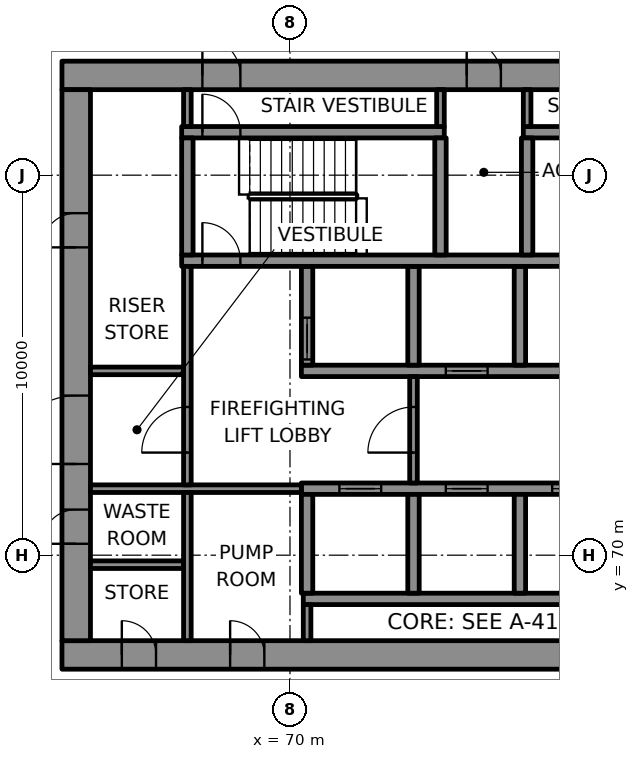
"""IFC4 building model, lengths in metres.
Left out: names, types, materials, properties, quantities, classifications, styles, units other than length and angle.
Written with IfcOpenShell. Run it as: python <this file> out.ifc"""

import sys

from ifc_helpers import new_model, si_unit, direction, frame, frame_2d, origin, place, context, subcontext, project, spatial, rectangle, extrude, element, fill, save


model = new_model("IFC4")
c1 = context("Model", 3, precision=1e-05, world=origin(), true_north=direction((0.0, 1.0)))
c2 = subcontext(c1, "Body", "Model", "MODEL_VIEW")
j1 = project(units=[si_unit("LENGTHUNIT", "METRE"), si_unit("PLANEANGLEUNIT", "RADIAN")], contexts=[c1])
p1 = place(None, origin())
s1 = spatial("IfcSite", under=j1, at=p1, CompositionType="ELEMENT")
p2 = place(p1, origin())
s2 = spatial("IfcBuilding", under=s1, at=p2, CompositionType="ELEMENT")
p3 = place(p2, frame((0.0, 0.0, 183.1)))
s3 = spatial("IfcBuildingStorey", under=s2, at=p3, CompositionType="ELEMENT", Elevation=183.1)
p4 = place(p3, frame((64.0, 67.375, 0.0), z_axis=(0.0, 0.0, 1.0), x_axis=(1.0, 0.0, 0.0)))
e1 = element("IfcWall", 1, at=p4, inside=s3, PredefinedType="SHEAR", context=c2, shape_type="SweptSolid", body=[
    extrude(rectangle(XDim=22.0, YDim=0.75, at=frame_2d((11.0, 0.0))), origin(), (0.0, 0.0, 1.0), 3.7),
])
p5 = place(p4, frame((1.575, 0.0, 0.0)))
e2 = element("IfcOpeningElement", 2, at=p5, cuts=e1, PredefinedType="OPENING", context=c2, shape_type="SweptSolid", body=[
    extrude(rectangle(XDim=0.9, YDim=2.1, at=frame_2d((0.45, 1.05))), frame((0.0, 0.385, 0.0), z_axis=(0.0, -1.0, 0.0), x_axis=(1.0, 0.0, 0.0)), (0.0, 0.0, 1.0), 0.77),
])
p6 = place(p4, frame((4.425, 0.0, 0.0)))
e3 = element("IfcOpeningElement", 3, at=p6, cuts=e1, PredefinedType="OPENING", context=c2, shape_type="SweptSolid", body=[
    extrude(rectangle(XDim=0.9, YDim=2.1, at=frame_2d((0.45, 1.05))), frame((0.0, 0.385, 0.0), z_axis=(0.0, -1.0, 0.0), x_axis=(1.0, 0.0, 0.0)), (0.0, 0.0, 1.0), 0.77),
])
p7 = place(p3, frame((64.0, 82.625, 0.0), z_axis=(0.0, 0.0, 1.0), x_axis=(1.0, 0.0, 0.0)))
e4 = element("IfcWall", 4, at=p7, inside=s3, PredefinedType="SHEAR", context=c2, shape_type="SweptSolid", body=[
    extrude(rectangle(XDim=22.0, YDim=0.75, at=frame_2d((11.0, 0.0))), origin(), (0.0, 0.0, 1.0), 3.7),
])
p8 = place(p7, frame((3.695, 0.0, 0.0)))
e5 = element("IfcOpeningElement", 5, at=p8, cuts=e4, PredefinedType="OPENING", context=c2, shape_type="SweptSolid", body=[
    extrude(rectangle(XDim=1.0, YDim=2.1, at=frame_2d((0.5, 1.05))), frame((0.0, 0.385, 0.0), z_axis=(0.0, -1.0, 0.0), x_axis=(1.0, 0.0, 0.0)), (0.0, 0.0, 1.0), 0.77),
])
p9 = place(p7, frame((17.505, 0.0, 0.0)))
e6 = element("IfcOpeningElement", 6, at=p9, cuts=e4, PredefinedType="OPENING", context=c2, shape_type="SweptSolid", body=[
    extrude(rectangle(XDim=1.0, YDim=2.1, at=frame_2d((0.5, 1.05))), frame((0.0, 0.385, 0.0), z_axis=(0.0, -1.0, 0.0), x_axis=(1.0, 0.0, 0.0)), (0.0, 0.0, 1.0), 0.77),
])
p10 = place(p7, frame((10.65, 0.0, 0.0)))
e7 = element("IfcOpeningElement", 7, at=p10, cuts=e4, PredefinedType="OPENING", context=c2, shape_type="SweptSolid", body=[
    extrude(rectangle(XDim=0.9, YDim=2.1, at=frame_2d((0.45, 1.05))), frame((0.0, 0.385, 0.0), z_axis=(0.0, -1.0, 0.0), x_axis=(1.0, 0.0, 0.0)), (0.0, 0.0, 1.0), 0.77),
])
p11 = place(p3, frame((64.375, 67.75, 0.0), z_axis=(0.0, 0.0, 1.0), x_axis=(0.0, 1.0, 0.0)))
e8 = element("IfcWall", 8, at=p11, inside=s3, PredefinedType="SHEAR", context=c2, shape_type="SweptSolid", body=[
    extrude(rectangle(XDim=14.5, YDim=0.75, at=frame_2d((7.25, 0.0))), origin(), (0.0, 0.0, 1.0), 3.7),
])
p12 = place(p11, frame((4.65, 0.0, 0.0)))
e9 = element("IfcOpeningElement", 9, at=p12, cuts=e8, PredefinedType="OPENING", context=c2, shape_type="SweptSolid", body=[
    extrude(rectangle(XDim=1.8, YDim=2.1, at=frame_2d((0.9, 1.05))), frame((0.0, 0.385, 0.0), z_axis=(0.0, -1.0, 0.0), x_axis=(1.0, 0.0, 0.0)), (0.0, 0.0, 1.0), 0.77),
])
p13 = place(p11, frame((2.55, 0.0, 0.0)))
e10 = element("IfcOpeningElement", 10, at=p13, cuts=e8, PredefinedType="OPENING", context=c2, shape_type="SweptSolid", body=[
    extrude(rectangle(XDim=0.9, YDim=2.1, at=frame_2d((0.45, 1.05))), frame((0.0, 0.385, 0.0), z_axis=(0.0, -1.0, 0.0), x_axis=(1.0, 0.0, 0.0)), (0.0, 0.0, 1.0), 0.77),
])
p14 = place(p11, frame((10.35, 0.0, 0.0)))
e11 = element("IfcOpeningElement", 11, at=p14, cuts=e8, PredefinedType="OPENING", context=c2, shape_type="SweptSolid", body=[
    extrude(rectangle(XDim=0.9, YDim=2.1, at=frame_2d((0.45, 1.05))), frame((0.0, 0.385, 0.0), z_axis=(0.0, -1.0, 0.0), x_axis=(1.0, 0.0, 0.0)), (0.0, 0.0, 1.0), 0.77),
])
p15 = place(p3, frame((70.35, 68.85, 0.0), z_axis=(0.0, 0.0, 1.0), x_axis=(1.0, 0.0, 0.0)))
e12 = element("IfcWall", 12, at=p15, inside=s3, PredefinedType="SHEAR", context=c2, shape_type="SweptSolid", body=[
    extrude(rectangle(XDim=14.2, YDim=0.3, at=frame_2d((7.1, 0.0))), origin(), (0.0, 0.0, 1.0), 3.7),
])
p16 = place(p3, frame((70.3, 71.75, 0.0), z_axis=(0.0, 0.0, 1.0), x_axis=(1.0, 0.0, 0.0)))
e13 = element("IfcWall", 13, at=p16, inside=s3, PredefinedType="SHEAR", context=c2, shape_type="SweptSolid", body=[
    extrude(rectangle(XDim=14.3, YDim=0.3, at=frame_2d((7.15, 0.0))), origin(), (0.0, 0.0, 1.0), 3.7),
])
p17 = place(p16, frame((1.0, 0.0, 0.0)))
e14 = element("IfcOpeningElement", 14, at=p17, cuts=e13, PredefinedType="OPENING", context=c2, shape_type="SweptSolid", body=[
    extrude(rectangle(XDim=1.1, YDim=2.1, at=frame_2d((0.55, 1.05))), frame((0.0, 0.16, 0.0), z_axis=(0.0, -1.0, 0.0), x_axis=(1.0, 0.0, 0.0)), (0.0, 0.0, 1.0), 0.32),
])
p18 = place(p16, frame((3.8, 0.0, 0.0)))
e15 = element("IfcOpeningElement", 15, at=p18, cuts=e13, PredefinedType="OPENING", context=c2, shape_type="SweptSolid", body=[
    extrude(rectangle(XDim=1.1, YDim=2.1, at=frame_2d((0.55, 1.05))), frame((0.0, 0.16, 0.0), z_axis=(0.0, -1.0, 0.0), x_axis=(1.0, 0.0, 0.0)), (0.0, 0.0, 1.0), 0.32),
])
p19 = place(p16, frame((6.6, 0.0, 0.0)))
e16 = element("IfcOpeningElement", 16, at=p19, cuts=e13, PredefinedType="OPENING", context=c2, shape_type="SweptSolid", body=[
    extrude(rectangle(XDim=1.1, YDim=2.1, at=frame_2d((0.55, 1.05))), frame((0.0, 0.16, 0.0), z_axis=(0.0, -1.0, 0.0), x_axis=(1.0, 0.0, 0.0)), (0.0, 0.0, 1.0), 0.32),
])
p20 = place(p16, frame((9.4, 0.0, 0.0)))
e17 = element("IfcOpeningElement", 17, at=p20, cuts=e13, PredefinedType="OPENING", context=c2, shape_type="SweptSolid", body=[
    extrude(rectangle(XDim=1.1, YDim=2.1, at=frame_2d((0.55, 1.05))), frame((0.0, 0.16, 0.0), z_axis=(0.0, -1.0, 0.0), x_axis=(1.0, 0.0, 0.0)), (0.0, 0.0, 1.0), 0.32),
])
p21 = place(p16, frame((12.2, 0.0, 0.0)))
e18 = element("IfcOpeningElement", 18, at=p21, cuts=e13, PredefinedType="OPENING", context=c2, shape_type="SweptSolid", body=[
    extrude(rectangle(XDim=1.1, YDim=2.1, at=frame_2d((0.55, 1.05))), frame((0.0, 0.16, 0.0), z_axis=(0.0, -1.0, 0.0), x_axis=(1.0, 0.0, 0.0)), (0.0, 0.0, 1.0), 0.32),
])
p22 = place(p3, frame((70.3, 74.85, 0.0), z_axis=(0.0, 0.0, 1.0), x_axis=(1.0, 0.0, 0.0)))
e19 = element("IfcWall", 19, at=p22, inside=s3, PredefinedType="SHEAR", context=c2, shape_type="SweptSolid", body=[
    extrude(rectangle(XDim=14.3, YDim=0.3, at=frame_2d((7.15, 0.0))), origin(), (0.0, 0.0, 1.0), 3.7),
])
p23 = place(p22, frame((3.8, 0.0, 0.0)))
e20 = element("IfcOpeningElement", 20, at=p23, cuts=e19, PredefinedType="OPENING", context=c2, shape_type="SweptSolid", body=[
    extrude(rectangle(XDim=1.1, YDim=2.1, at=frame_2d((0.55, 1.05))), frame((0.0, 0.16, 0.0), z_axis=(0.0, -1.0, 0.0), x_axis=(1.0, 0.0, 0.0)), (0.0, 0.0, 1.0), 0.32),
])
p24 = place(p22, frame((12.2, 0.0, 0.0)))
e21 = element("IfcOpeningElement", 21, at=p24, cuts=e19, PredefinedType="OPENING", context=c2, shape_type="SweptSolid", body=[
    extrude(rectangle(XDim=1.1, YDim=2.1, at=frame_2d((0.55, 1.05))), frame((0.0, 0.16, 0.0), z_axis=(0.0, -1.0, 0.0), x_axis=(1.0, 0.0, 0.0)), (0.0, 0.0, 1.0), 0.32),
])
p25 = place(p3, frame((70.45, 69.0, 0.0), z_axis=(0.0, 0.0, 1.0), x_axis=(0.0, 1.0, 0.0)))
e22 = element("IfcWall", 22, at=p25, inside=s3, PredefinedType="SHEAR", context=c2, shape_type="SweptSolid", body=[
    extrude(rectangle(XDim=2.6, YDim=0.3, at=frame_2d((1.3, 0.0))), origin(), (0.0, 0.0, 1.0), 3.7),
])
p26 = place(p3, frame((70.45, 75.0, 0.0), z_axis=(0.0, 0.0, 1.0), x_axis=(0.0, 1.0, 0.0)))
e23 = element("IfcWall", 23, at=p26, inside=s3, PredefinedType="SHEAR", context=c2, shape_type="SweptSolid", body=[
    extrude(rectangle(XDim=2.6, YDim=0.3, at=frame_2d((1.3, 0.0))), origin(), (0.0, 0.0, 1.0), 3.7),
])
p27 = place(p26, frame((0.15, 0.0, 0.0)))
e24 = element("IfcOpeningElement", 24, at=p27, cuts=e23, PredefinedType="OPENING", context=c2, shape_type="SweptSolid", body=[
    extrude(rectangle(XDim=1.1, YDim=2.1, at=frame_2d((0.55, 1.05))), frame((0.0, 0.16, 0.0), z_axis=(0.0, -1.0, 0.0), x_axis=(1.0, 0.0, 0.0)), (0.0, 0.0, 1.0), 0.32),
])
for number, where, z_axis, x_axis in (
    (25, (73.25, 69.0, 0.0), (0.0, 0.0, 1.0), (0.0, 1.0, 0.0)),
    (26, (73.25, 75.0, 0.0), (0.0, 0.0, 1.0), (0.0, 1.0, 0.0)),
    (27, (76.05, 69.0, 0.0), (0.0, 0.0, 1.0), (0.0, 1.0, 0.0)),
    (28, (76.05, 75.0, 0.0), (0.0, 0.0, 1.0), (0.0, 1.0, 0.0)),
):
    element("IfcWall", number, at=place(p3, frame(where, z_axis=z_axis, x_axis=x_axis)), inside=s3, PredefinedType="SHEAR", context=c2, shape_type="SweptSolid", body=[
        extrude(rectangle(XDim=2.6, YDim=0.3, at=frame_2d((1.3, 0.0))), origin(), (0.0, 0.0, 1.0), 3.7),
    ])
p28 = place(p3, frame((67.15, 77.75, 0.0), z_axis=(0.0, 0.0, 1.0), x_axis=(1.0, 0.0, 0.0)))
e29 = element("IfcWall", 29, at=p28, inside=s3, PredefinedType="SHEAR", context=c2, shape_type="SweptSolid", body=[
    extrude(rectangle(XDim=17.45, YDim=0.3, at=frame_2d((8.725, 0.0))), origin(), (0.0, 0.0, 1.0), 3.7),
])
p29 = place(p28, frame((0.545, 0.0, 0.0)))
e30 = element("IfcOpeningElement", 30, at=p29, cuts=e29, PredefinedType="OPENING", context=c2, shape_type="SweptSolid", body=[
    extrude(rectangle(XDim=1.0, YDim=2.1, at=frame_2d((0.5, 1.05))), frame((0.0, 0.16, 0.0), z_axis=(0.0, -1.0, 0.0), x_axis=(1.0, 0.0, 0.0)), (0.0, 0.0, 1.0), 0.32),
])
p30 = place(p3, frame((67.15, 81.13, 0.0), z_axis=(0.0, 0.0, 1.0), x_axis=(1.0, 0.0, 0.0)))
e31 = element("IfcWall", 31, at=p30, inside=s3, PredefinedType="SHEAR", context=c2, shape_type="SweptSolid", body=[
    extrude(rectangle(XDim=6.91, YDim=0.3, at=frame_2d((3.455, 0.0))), origin(), (0.0, 0.0, 1.0), 3.7),
])
p31 = place(p30, frame((0.545, 0.0, 0.0)))
e32 = element("IfcOpeningElement", 32, at=p31, cuts=e31, PredefinedType="OPENING", context=c2, shape_type="SweptSolid", body=[
    extrude(rectangle(XDim=1.0, YDim=2.1, at=frame_2d((0.5, 1.05))), frame((0.0, 0.16, 0.0), z_axis=(0.0, -1.0, 0.0), x_axis=(1.0, 0.0, 0.0)), (0.0, 0.0, 1.0), 0.32),
])
p32 = place(p3, frame((76.14, 81.13, 0.0), z_axis=(0.0, 0.0, 1.0), x_axis=(1.0, 0.0, 0.0)))
e33 = element("IfcWall", 33, at=p32, inside=s3, PredefinedType="SHEAR", context=c2, shape_type="SweptSolid", body=[
    extrude(rectangle(XDim=6.86, YDim=0.3, at=frame_2d((3.43, 0.0))), origin(), (0.0, 0.0, 1.0), 3.7),
])
p33 = place(p32, frame((5.365, 0.0, 0.0)))
e34 = element("IfcOpeningElement", 34, at=p33, cuts=e33, PredefinedType="OPENING", context=c2, shape_type="SweptSolid", body=[
    extrude(rectangle(XDim=1.0, YDim=2.1, at=frame_2d((0.5, 1.05))), frame((0.0, 0.16, 0.0), z_axis=(0.0, -1.0, 0.0), x_axis=(1.0, 0.0, 0.0)), (0.0, 0.0, 1.0), 0.32),
])
for number, where, z_axis, x_axis in (
    (35, (67.3, 77.9, 0.0), (0.0, 0.0, 1.0), (0.0, 1.0, 0.0)),
    (36, (73.96, 77.9, 0.0), (0.0, 0.0, 1.0), (0.0, 1.0, 0.0)),
    (37, (76.24, 77.9, 0.0), (0.0, 0.0, 1.0), (0.0, 1.0, 0.0)),
):
    element("IfcWall", number, at=place(p3, frame(where, z_axis=z_axis, x_axis=x_axis)), inside=s3, PredefinedType="SHEAR", context=c2, shape_type="SweptSolid", body=[
        extrude(rectangle(XDim=3.08, YDim=0.3, at=frame_2d((1.54, 0.0))), origin(), (0.0, 0.0, 1.0), 3.7),
    ])
p34 = place(p3, frame((64.75, 69.75, 0.0), z_axis=(0.0, 0.0, 1.0), x_axis=(1.0, 0.0, 0.0)))
e38 = element("IfcWall", 38, at=p34, inside=s3, PredefinedType="PARTITIONING", context=c2, shape_type="SweptSolid", body=[
    extrude(rectangle(XDim=2.45, YDim=0.2, at=frame_2d((1.225, 0.0))), origin(), (0.0, 0.0, 1.0), 3.7),
])
p35 = place(p3, frame((64.75, 71.75, 0.0), z_axis=(0.0, 0.0, 1.0), x_axis=(1.0, 0.0, 0.0)))
e39 = element("IfcWall", 39, at=p35, inside=s3, PredefinedType="PARTITIONING", context=c2, shape_type="SweptSolid", body=[
    extrude(rectangle(XDim=5.55, YDim=0.2, at=frame_2d((2.775, 0.0))), origin(), (0.0, 0.0, 1.0), 3.7),
])
p36 = place(p3, frame((64.75, 74.85, 0.0), z_axis=(0.0, 0.0, 1.0), x_axis=(1.0, 0.0, 0.0)))
e40 = element("IfcWall", 40, at=p36, inside=s3, PredefinedType="PARTITIONING", context=c2, shape_type="SweptSolid", body=[
    extrude(rectangle(XDim=2.45, YDim=0.2, at=frame_2d((1.225, 0.0))), origin(), (0.0, 0.0, 1.0), 3.7),
])
p37 = place(p3, frame((67.3, 67.75, 0.0), z_axis=(0.0, 0.0, 1.0), x_axis=(0.0, 1.0, 0.0)))
e41 = element("IfcWall", 41, at=p37, inside=s3, PredefinedType="PARTITIONING", context=c2, shape_type="SweptSolid", body=[
    extrude(rectangle(XDim=3.9, YDim=0.2, at=frame_2d((1.95, 0.0))), origin(), (0.0, 0.0, 1.0), 3.7),
])
p38 = place(p3, frame((67.3, 71.85, 0.0), z_axis=(0.0, 0.0, 1.0), x_axis=(0.0, 1.0, 0.0)))
e42 = element("IfcWall", 42, at=p38, inside=s3, PredefinedType="PARTITIONING", context=c2, shape_type="SweptSolid", body=[
    extrude(rectangle(XDim=5.75, YDim=0.2, at=frame_2d((2.875, 0.0))), origin(), (0.0, 0.0, 1.0), 3.7),
])
p39 = place(p38, frame((0.85, 0.0, 0.0)))
e43 = element("IfcOpeningElement", 43, at=p39, cuts=e42, PredefinedType="OPENING", context=c2, shape_type="SweptSolid", body=[
    extrude(rectangle(XDim=1.2, YDim=2.1, at=frame_2d((0.6, 1.05))), frame((0.0, 0.11, 0.0), z_axis=(0.0, -1.0, 0.0), x_axis=(1.0, 0.0, 0.0)), (0.0, 0.0, 1.0), 0.22),
])
p40 = place(p3, frame((67.3, 81.28, 0.0), z_axis=(0.0, 0.0, 1.0), x_axis=(0.0, 1.0, 0.0)))
e44 = element("IfcWall", 44, at=p40, inside=s3, PredefinedType="PARTITIONING", context=c2, shape_type="SweptSolid", body=[
    extrude(rectangle(XDim=0.97, YDim=0.2, at=frame_2d((0.485, 0.0))), origin(), (0.0, 0.0, 1.0), 3.7),
])
p41 = place(p3, frame((70.45, 67.75, 0.0), z_axis=(0.0, 0.0, 1.0), x_axis=(0.0, 1.0, 0.0)))
e45 = element("IfcWall", 45, at=p41, inside=s3, PredefinedType="PARTITIONING", context=c2, shape_type="SweptSolid", body=[
    extrude(rectangle(XDim=0.95, YDim=0.2, at=frame_2d((0.475, 0.0))), origin(), (0.0, 0.0, 1.0), 3.7),
])
p42 = place(p3, frame((73.25, 71.9, 0.0), z_axis=(0.0, 0.0, 1.0), x_axis=(0.0, 1.0, 0.0)))
e46 = element("IfcWall", 46, at=p42, inside=s3, PredefinedType="PARTITIONING", context=c2, shape_type="SweptSolid", body=[
    extrude(rectangle(XDim=2.8, YDim=0.2, at=frame_2d((1.4, 0.0))), origin(), (0.0, 0.0, 1.0), 3.7),
])
p43 = place(p42, frame((0.8, 0.0, 0.0)))
e47 = element("IfcOpeningElement", 47, at=p43, cuts=e46, PredefinedType="OPENING", context=c2, shape_type="SweptSolid", body=[
    extrude(rectangle(XDim=1.2, YDim=2.1, at=frame_2d((0.6, 1.05))), frame((0.0, 0.11, 0.0), z_axis=(0.0, -1.0, 0.0), x_axis=(1.0, 0.0, 0.0)), (0.0, 0.0, 1.0), 0.22),
])
for number, where, z_axis, x_axis in (
    (48, (73.96, 81.28, 0.0), (0.0, 0.0, 1.0), (0.0, 1.0, 0.0)),
    (49, (76.24, 81.28, 0.0), (0.0, 0.0, 1.0), (0.0, 1.0, 0.0)),
):
    element("IfcWall", number, at=place(p3, frame(where, z_axis=z_axis, x_axis=x_axis)), inside=s3, PredefinedType="PARTITIONING", context=c2, shape_type="SweptSolid", body=[
        extrude(rectangle(XDim=0.97, YDim=0.2, at=frame_2d((0.485, 0.0))), origin(), (0.0, 0.0, 1.0), 3.7),
    ])
p44 = place(p17, origin())
e50 = element("IfcDoor", 50, at=p44, inside=s3, OperationType="DOUBLE_DOOR_SLIDING", PredefinedType="DOOR", context=c2, shape_type="SweptSolid", body=[
    extrude(rectangle(XDim=1.1, YDim=2.1, at=frame_2d((0.55, 1.05))), frame((0.0, 0.025, 0.0), z_axis=(0.0, -1.0, 0.0), x_axis=(1.0, 0.0, 0.0)), (0.0, 0.0, 1.0), 0.05),
])
fill(e14, e50)
p45 = place(p18, origin())
e51 = element("IfcDoor", 51, at=p45, inside=s3, OperationType="DOUBLE_DOOR_SLIDING", PredefinedType="DOOR", context=c2, shape_type="SweptSolid", body=[
    extrude(rectangle(XDim=1.1, YDim=2.1, at=frame_2d((0.55, 1.05))), frame((0.0, 0.025, 0.0), z_axis=(0.0, -1.0, 0.0), x_axis=(1.0, 0.0, 0.0)), (0.0, 0.0, 1.0), 0.05),
])
fill(e15, e51)
p46 = place(p19, origin())
e52 = element("IfcDoor", 52, at=p46, inside=s3, OperationType="DOUBLE_DOOR_SLIDING", PredefinedType="DOOR", context=c2, shape_type="SweptSolid", body=[
    extrude(rectangle(XDim=1.1, YDim=2.1, at=frame_2d((0.55, 1.05))), frame((0.0, 0.025, 0.0), z_axis=(0.0, -1.0, 0.0), x_axis=(1.0, 0.0, 0.0)), (0.0, 0.0, 1.0), 0.05),
])
fill(e16, e52)
p47 = place(p27, origin())
e53 = element("IfcDoor", 53, at=p47, inside=s3, OperationType="DOUBLE_DOOR_SLIDING", PredefinedType="DOOR", context=c2, shape_type="SweptSolid", body=[
    extrude(rectangle(XDim=1.1, YDim=2.1, at=frame_2d((0.55, 1.05))), frame((0.0, 0.025, 0.0), z_axis=(0.0, -1.0, 0.0), x_axis=(1.0, 0.0, 0.0)), (0.0, 0.0, 1.0), 0.05),
])
fill(e24, e53)
p48 = place(p23, origin())
e54 = element("IfcDoor", 54, at=p48, inside=s3, OperationType="DOUBLE_DOOR_SLIDING", PredefinedType="DOOR", context=c2, shape_type="SweptSolid", body=[
    extrude(rectangle(XDim=1.1, YDim=2.1, at=frame_2d((0.55, 1.05))), frame((0.0, 0.025, 0.0), z_axis=(0.0, -1.0, 0.0), x_axis=(1.0, 0.0, 0.0)), (0.0, 0.0, 1.0), 0.05),
])
fill(e20, e54)
p49 = place(p29, origin())
e55 = element("IfcDoor", 55, at=p49, inside=s3, OperationType="SINGLE_SWING_LEFT", PredefinedType="DOOR", context=c2, shape_type="SweptSolid", body=[
    extrude(rectangle(XDim=1.0, YDim=2.1, at=frame_2d((0.5, 1.05))), frame((0.0, 0.025, 0.0), z_axis=(0.0, -1.0, 0.0), x_axis=(1.0, 0.0, 0.0)), (0.0, 0.0, 1.0), 0.05),
])
fill(e30, e55)
p50 = place(p31, origin())
e56 = element("IfcDoor", 56, at=p50, inside=s3, OperationType="SINGLE_SWING_RIGHT", PredefinedType="DOOR", context=c2, shape_type="SweptSolid", body=[
    extrude(rectangle(XDim=1.0, YDim=2.1, at=frame_2d((0.5, 1.05))), frame((0.0, 0.025, 0.0), z_axis=(0.0, -1.0, 0.0), x_axis=(1.0, 0.0, 0.0)), (0.0, 0.0, 1.0), 0.05),
])
fill(e32, e56)
p51 = place(p8, origin())
e57 = element("IfcDoor", 57, at=p51, inside=s3, OperationType="SINGLE_SWING_LEFT", PredefinedType="DOOR", context=c2, shape_type="SweptSolid", body=[
    extrude(rectangle(XDim=1.0, YDim=2.1, at=frame_2d((0.5, 1.05))), frame((0.0, 0.095, 0.0), z_axis=(0.0, -1.0, 0.0), x_axis=(1.0, 0.0, 0.0)), (0.0, 0.0, 1.0), 0.19),
])
fill(e5, e57)
p52 = place(p43, origin())
e58 = element("IfcDoor", 58, at=p52, inside=s3, OperationType="SINGLE_SWING_LEFT", PredefinedType="DOOR", context=c2, shape_type="SweptSolid", body=[
    extrude(rectangle(XDim=1.2, YDim=2.1, at=frame_2d((0.6, 1.05))), frame((0.0, 0.025, 0.0), z_axis=(0.0, -1.0, 0.0), x_axis=(1.0, 0.0, 0.0)), (0.0, 0.0, 1.0), 0.05),
])
fill(e47, e58)
p53 = place(p39, origin())
e59 = element("IfcDoor", 59, at=p53, inside=s3, OperationType="SINGLE_SWING_RIGHT", PredefinedType="DOOR", context=c2, shape_type="SweptSolid", body=[
    extrude(rectangle(XDim=1.2, YDim=2.1, at=frame_2d((0.6, 1.05))), frame((0.0, 0.025, 0.0), z_axis=(0.0, -1.0, 0.0), x_axis=(1.0, 0.0, 0.0)), (0.0, 0.0, 1.0), 0.05),
])
fill(e43, e59)
p54 = place(p12, origin())
e60 = element("IfcDoor", 60, at=p54, inside=s3, OperationType="SINGLE_SWING_LEFT", PredefinedType="DOOR", context=c2, shape_type="SweptSolid", body=[
    extrude(rectangle(XDim=1.8, YDim=2.1, at=frame_2d((0.9, 1.05))), frame((0.0, 0.095, 0.0), z_axis=(0.0, -1.0, 0.0), x_axis=(1.0, 0.0, 0.0)), (0.0, 0.0, 1.0), 0.19),
])
fill(e9, e60)
p55 = place(p5, origin())
e61 = element("IfcDoor", 61, at=p55, inside=s3, OperationType="SINGLE_SWING_LEFT", PredefinedType="DOOR", context=c2, shape_type="SweptSolid", body=[
    extrude(rectangle(XDim=0.9, YDim=2.1, at=frame_2d((0.45, 1.05))), frame((0.0, 0.095, 0.0), z_axis=(0.0, -1.0, 0.0), x_axis=(1.0, 0.0, 0.0)), (0.0, 0.0, 1.0), 0.19),
])
fill(e2, e61)
p56 = place(p13, origin())
e62 = element("IfcDoor", 62, at=p56, inside=s3, OperationType="SINGLE_SWING_RIGHT", PredefinedType="DOOR", context=c2, shape_type="SweptSolid", body=[
    extrude(rectangle(XDim=0.9, YDim=2.1, at=frame_2d((0.45, 1.05))), frame((0.0, 0.095, 0.0), z_axis=(0.0, -1.0, 0.0), x_axis=(1.0, 0.0, 0.0)), (0.0, 0.0, 1.0), 0.19),
])
fill(e10, e62)
p57 = place(p6, origin())
e63 = element("IfcDoor", 63, at=p57, inside=s3, OperationType="SINGLE_SWING_LEFT", PredefinedType="DOOR", context=c2, shape_type="SweptSolid", body=[
    extrude(rectangle(XDim=0.9, YDim=2.1, at=frame_2d((0.45, 1.05))), frame((0.0, 0.095, 0.0), z_axis=(0.0, -1.0, 0.0), x_axis=(1.0, 0.0, 0.0)), (0.0, 0.0, 1.0), 0.19),
])
fill(e3, e63)
p58 = place(p14, origin())
e64 = element("IfcDoor", 64, at=p58, inside=s3, OperationType="SINGLE_SWING_RIGHT", PredefinedType="DOOR", context=c2, shape_type="SweptSolid", body=[
    extrude(rectangle(XDim=0.9, YDim=2.1, at=frame_2d((0.45, 1.05))), frame((0.0, 0.095, 0.0), z_axis=(0.0, -1.0, 0.0), x_axis=(1.0, 0.0, 0.0)), (0.0, 0.0, 1.0), 0.19),
])
fill(e11, e64)
p59 = place(p10, origin())
e65 = element("IfcDoor", 65, at=p59, inside=s3, OperationType="SINGLE_SWING_LEFT", PredefinedType="DOOR", context=c2, shape_type="SweptSolid", body=[
    extrude(rectangle(XDim=0.9, YDim=2.1, at=frame_2d((0.45, 1.05))), frame((0.0, 0.095, 0.0), z_axis=(0.0, -1.0, 0.0), x_axis=(1.0, 0.0, 0.0)), (0.0, 0.0, 1.0), 0.19),
])
fill(e7, e65)
save(model, sys.argv[1])
